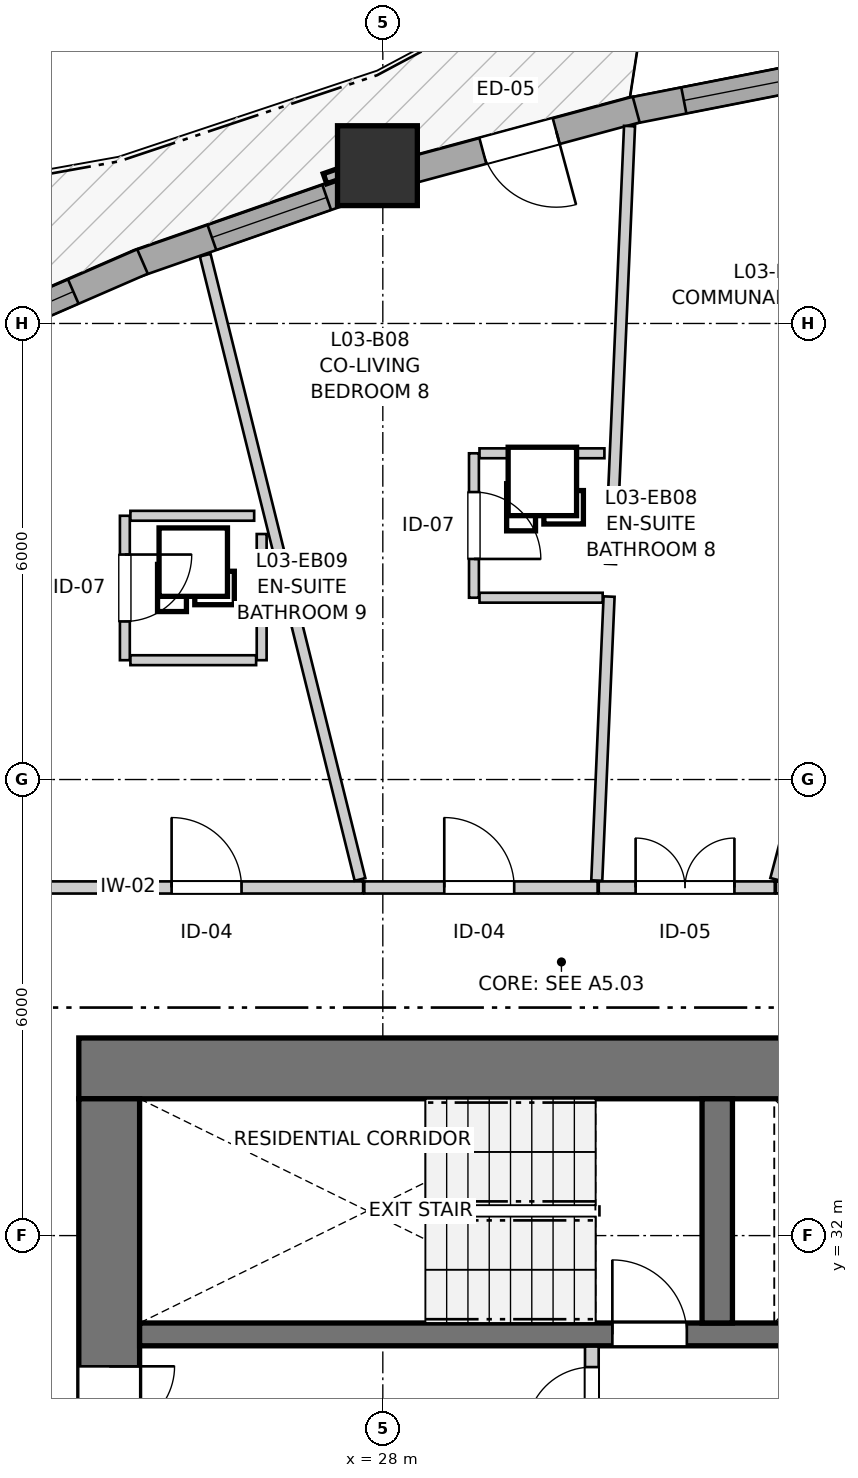
"""IFC4 building model, lengths in metres.
Left out: names, types, materials, properties, quantities, classifications, styles, units other than length and angle.
Written with IfcOpenShell. Run it as: python <this file> out.ifc"""

import sys

from ifc_helpers import new_model, si_unit, direction, frame, frame_2d, origin, origin_2d, place, context, subcontext, project, spatial, rectangle, extrude, source, transform, mapped, element, fill, save


model = new_model("IFC4")
c1 = context("Model", 3, precision=1e-05, world=origin(), true_north=direction((0.0, 1.0)))
c2 = subcontext(c1, "Body", "Model", "MODEL_VIEW")
j1 = project(units=[si_unit("LENGTHUNIT", "METRE"), si_unit("PLANEANGLEUNIT", "RADIAN")], contexts=[c1])
p1 = place(None, origin())
s1 = spatial("IfcSite", under=j1, at=p1, CompositionType="ELEMENT")
p2 = place(p1, origin())
s2 = spatial("IfcBuilding", under=s1, at=p2, CompositionType="ELEMENT")
p3 = place(p2, frame((0.0, 0.0, 14.2)))
s3 = spatial("IfcBuildingStorey", under=s2, at=p3, CompositionType="ELEMENT", Elevation=14.2)
p4 = place(p3, frame((36.7, 34.2, 0.0), z_axis=(0.0, 0.0, 1.0), x_axis=(-1.0, 0.0, 0.0)))
e1 = element("IfcWall", 1, at=p4, inside=s3, PredefinedType="SHEAR", context=c2, shape_type="SweptSolid", body=[
    extrude(rectangle(XDim=12.7, YDim=0.8, at=frame_2d((6.35, 0.0))), origin(), (0.0, 0.0, 1.0), 2.94),
])
p5 = place(p3, frame((24.4, 33.8, 0.0), z_axis=(0.0, 0.0, 1.0), x_axis=(0.0, -1.0, 0.0)))
e2 = element("IfcWall", 2, at=p5, inside=s3, PredefinedType="SHEAR", context=c2, shape_type="SweptSolid", body=[
    extrude(rectangle(XDim=15.6, YDim=0.8, at=frame_2d((7.8, 0.0))), origin(), (0.0, 0.0, 1.0), 2.94),
])
p6 = place(p5, frame((7.05, 0.0, 0.0)))
e3 = element("IfcOpeningElement", 3, at=p6, cuts=e2, PredefinedType="OPENING", context=c2, shape_type="SweptSolid", body=[
    extrude(rectangle(XDim=1.5, YDim=2.15, at=frame_2d((0.75, 1.075))), frame((0.0, 0.41, 0.0), z_axis=(0.0, -1.0, 0.0), x_axis=(1.0, 0.0, 0.0)), (0.0, 0.0, 1.0), 0.82),
])
p7 = place(p5, frame((3.52, 0.0, 0.0)))
e4 = element("IfcOpeningElement", 4, at=p7, cuts=e2, PredefinedType="OPENING", context=c2, shape_type="SweptSolid", body=[
    extrude(rectangle(XDim=0.86, YDim=2.05, at=frame_2d((0.43, 1.025))), frame((0.0, 0.41, 0.0), z_axis=(0.0, -1.0, 0.0), x_axis=(1.0, 0.0, 0.0)), (0.0, 0.0, 1.0), 0.82),
])
p8 = place(p5, frame((11.22, 0.0, 0.0)))
e5 = element("IfcOpeningElement", 5, at=p8, cuts=e2, PredefinedType="OPENING", context=c2, shape_type="SweptSolid", body=[
    extrude(rectangle(XDim=0.86, YDim=2.05, at=frame_2d((0.43, 1.025))), frame((0.0, 0.41, 0.0), z_axis=(0.0, -1.0, 0.0), x_axis=(1.0, 0.0, 0.0)), (0.0, 0.0, 1.0), 0.82),
])
p9 = place(p3, frame((24.8, 30.7, 0.0), z_axis=(0.0, 0.0, 1.0), x_axis=(1.0, 0.0, 0.0)))
e6 = element("IfcWall", 6, at=p9, inside=s3, PredefinedType="SHEAR", context=c2, shape_type="SweptSolid", body=[
    extrude(rectangle(XDim=11.1, YDim=0.3, at=frame_2d((5.55, 0.0))), origin(), (0.0, 0.0, 1.0), 2.94),
])
p10 = place(p9, frame((6.22, 0.0, 0.0)))
e7 = element("IfcOpeningElement", 7, at=p10, cuts=e6, PredefinedType="OPENING", context=c2, shape_type="SweptSolid", body=[
    extrude(rectangle(XDim=0.98, YDim=2.15, at=frame_2d((0.49, 1.075))), frame((0.0, 0.16, 0.0), z_axis=(0.0, -1.0, 0.0), x_axis=(1.0, 0.0, 0.0)), (0.0, 0.0, 1.0), 0.32),
])
p11 = place(p9, frame((9.15, 0.0, 0.0)))
e8 = element("IfcOpeningElement", 8, at=p11, cuts=e6, PredefinedType="OPENING", context=c2, shape_type="SweptSolid", body=[
    extrude(rectangle(XDim=1.15, YDim=2.15, at=frame_2d((0.575, 1.075))), frame((0.0, 0.16, 0.0), z_axis=(0.0, -1.0, 0.0), x_axis=(1.0, 0.0, 0.0)), (0.0, 0.0, 1.0), 0.32),
])
p12 = place(p3, frame((32.4, 30.85, 0.0), z_axis=(0.0, 0.0, 1.0), x_axis=(0.0, 1.0, 0.0)))
e9 = element("IfcWall", 9, at=p12, inside=s3, PredefinedType="SHEAR", context=c2, shape_type="SweptSolid", body=[
    extrude(rectangle(XDim=2.95, YDim=0.4, at=frame_2d((1.475, 0.0))), origin(), (0.0, 0.0, 1.0), 2.94),
])
m1 = source(origin(), c2, "Body", "SweptSolid", [
    extrude(rectangle(XDim=1.05, YDim=1.05, at=origin_2d()), origin(), (0.0, 0.0, 1.0), 2.94),
])
p13 = place(p3, frame((27.929, 46.076, 0.0), z_axis=(0.0, 0.0, 1.0), x_axis=(1.0, 0.0, 0.0)))
e10 = element("IfcColumn", 10, at=p13, inside=s3, PredefinedType="COLUMN", context=c2, shape_type="MappedRepresentation", body=[
    mapped(m1, transform((0.0, 0.0, 0.0), x_axis=(1.0, 0.0, 0.0), y_axis=(0.0, 1.0, 0.0), z_axis=(0.0, 0.0, 1.0), scale=1.0)),
])
p14 = place(p3, frame((34.714, 47.475, 0.0), z_axis=(0.0, 0.0, 1.0), x_axis=(-0.981221268425, -0.192885516282, 0.0)))
e11 = element("IfcWall", 11, at=p14, inside=s3, PredefinedType="SOLIDWALL", context=c2, shape_type="SweptSolid", body=[
    extrude(rectangle(XDim=3.533, YDim=0.35, at=frame_2d((1.766, 0.0))), origin(), (0.0, 0.0, 1.0), 2.42),
])
p15 = place(p14, frame((0.706, 0.0, 0.82)))
e12 = element("IfcOpeningElement", 12, at=p15, cuts=e11, PredefinedType="OPENING", context=c2, shape_type="SweptSolid", body=[
    extrude(rectangle(XDim=2.1, YDim=1.4, at=frame_2d((1.05, 0.7))), frame((0.0, 0.185, 0.0), z_axis=(0.0, -1.0, 0.0), x_axis=(1.0, 0.0, 0.0)), (0.0, 0.0, 1.0), 0.37),
])
p16 = place(p3, frame((31.333, 46.814, 0.0), z_axis=(0.0, 0.0, 1.0), x_axis=(-0.965456905924, -0.260562780926, 0.0)))
e13 = element("IfcWall", 13, at=p16, inside=s3, PredefinedType="SOLIDWALL", context=c2, shape_type="SweptSolid", body=[
    extrude(rectangle(XDim=3.179, YDim=0.35, at=frame_2d((1.59, 0.0))), origin(), (0.0, 0.0, 1.0), 2.42),
])
p17 = place(p16, frame((1.09, 0.0, 0.0)))
e14 = element("IfcOpeningElement", 14, at=p17, cuts=e13, PredefinedType="OPENING", context=c2, shape_type="SweptSolid", body=[
    extrude(rectangle(XDim=1.0, YDim=2.1, at=frame_2d((0.5, 1.05))), frame((0.0, 0.185, 0.0), z_axis=(0.0, -1.0, 0.0), x_axis=(1.0, 0.0, 0.0)), (0.0, 0.0, 1.0), 0.37),
])
p18 = place(p3, frame((27.703, 45.812, 0.0), z_axis=(0.0, 0.0, 1.0), x_axis=(-0.944149283204, -0.329518028377, 0.0)))
e15 = element("IfcWall", 15, at=p18, inside=s3, PredefinedType="SOLIDWALL", context=c2, shape_type="SweptSolid", body=[
    extrude(rectangle(XDim=3.123, YDim=0.35, at=frame_2d((1.562, 0.0))), origin(), (0.0, 0.0, 1.0), 2.42),
])
p19 = place(p18, frame((0.468, 0.0, 0.82)))
e16 = element("IfcOpeningElement", 16, at=p19, cuts=e15, PredefinedType="OPENING", context=c2, shape_type="SweptSolid", body=[
    extrude(rectangle(XDim=1.6, YDim=1.35, at=frame_2d((0.8, 0.675))), frame((0.0, 0.185, 0.0), z_axis=(0.0, -1.0, 0.0), x_axis=(1.0, 0.0, 0.0)), (0.0, 0.0, 1.0), 0.37),
])
p20 = place(p3, frame((24.838, 44.815, 0.0), z_axis=(0.0, 0.0, 1.0), x_axis=(-0.917087357706, -0.398686315712, 0.0)))
e17 = element("IfcWall", 17, at=p20, inside=s3, PredefinedType="SOLIDWALL", context=c2, shape_type="SweptSolid", body=[
    extrude(rectangle(XDim=3.365, YDim=0.35, at=frame_2d((1.683, 0.0))), origin(), (0.0, 0.0, 1.0), 2.42),
])
p21 = place(p20, frame((0.992, 0.0, 0.82)))
e18 = element("IfcOpeningElement", 18, at=p21, cuts=e17, PredefinedType="OPENING", context=c2, shape_type="SweptSolid", body=[
    extrude(rectangle(XDim=1.4, YDim=1.35, at=frame_2d((0.7, 0.675))), frame((0.0, 0.185, 0.0), z_axis=(0.0, -1.0, 0.0), x_axis=(1.0, 0.0, 0.0)), (0.0, 0.0, 1.0), 0.37),
])
p22 = place(p3, frame((30.75, 27.43, 0.0), z_axis=(0.0, 0.0, 1.0), x_axis=(0.0, 1.0, 0.0)))
e19 = element("IfcWall", 19, at=p22, inside=s3, PredefinedType="PARTITIONING", context=c2, shape_type="SweptSolid", body=[
    extrude(rectangle(XDim=3.11, YDim=0.18, at=frame_2d((1.555, 0.0))), origin(), (0.0, 0.0, 1.0), 2.94),
])
p23 = place(p22, frame((1.98, 0.0, 0.0)))
e20 = element("IfcOpeningElement", 20, at=p23, cuts=e19, PredefinedType="OPENING", context=c2, shape_type="SweptSolid", body=[
    extrude(rectangle(XDim=0.86, YDim=2.05, at=frame_2d((0.43, 1.025))), frame((0.0, 0.1, 0.0), z_axis=(0.0, -1.0, 0.0), x_axis=(1.0, 0.0, 0.0)), (0.0, 0.0, 1.0), 0.2),
])
p24 = place(p3, frame((23.618, 36.58, 0.0), z_axis=(0.0, 0.0, 1.0), x_axis=(1.0, 0.0, 0.0)))
e21 = element("IfcWall", 21, at=p24, inside=s3, PredefinedType="PARTITIONING", context=c2, shape_type="SweptSolid", body=[
    extrude(rectangle(XDim=4.123, YDim=0.16, at=frame_2d((2.062, 0.0))), origin(), (0.0, 0.0, 1.0), 2.548),
])
p25 = place(p24, frame((1.603, 0.0, 0.0)))
e22 = element("IfcOpeningElement", 22, at=p25, cuts=e21, PredefinedType="OPENING", context=c2, shape_type="SweptSolid", body=[
    extrude(rectangle(XDim=0.92, YDim=2.1, at=frame_2d((0.46, 1.05))), frame((0.0, 0.09, 0.0), z_axis=(0.0, -1.0, 0.0), x_axis=(1.0, 0.0, 0.0)), (0.0, 0.0, 1.0), 0.18),
])
p26 = place(p3, frame((27.756, 36.58, 0.0), z_axis=(0.0, 0.0, 1.0), x_axis=(1.0, 0.0, 0.0)))
e23 = element("IfcWall", 23, at=p26, inside=s3, PredefinedType="PARTITIONING", context=c2, shape_type="SweptSolid", body=[
    extrude(rectangle(XDim=3.07, YDim=0.16, at=frame_2d((1.535, 0.0))), origin(), (0.0, 0.0, 1.0), 2.94),
])
p27 = place(p26, frame((1.052, 0.0, 0.0)))
e24 = element("IfcOpeningElement", 24, at=p27, cuts=e23, PredefinedType="OPENING", context=c2, shape_type="SweptSolid", body=[
    extrude(rectangle(XDim=0.92, YDim=2.1, at=frame_2d((0.46, 1.05))), frame((0.0, 0.09, 0.0), z_axis=(0.0, -1.0, 0.0), x_axis=(1.0, 0.0, 0.0)), (0.0, 0.0, 1.0), 0.18),
])
p28 = place(p3, frame((30.841, 36.58, 0.0), z_axis=(0.0, 0.0, 1.0), x_axis=(1.0, 0.0, 0.0)))
e25 = element("IfcWall", 25, at=p28, inside=s3, PredefinedType="PARTITIONING", context=c2, shape_type="SweptSolid", body=[
    extrude(rectangle(XDim=2.316, YDim=0.16, at=frame_2d((1.158, 0.0))), origin(), (0.0, 0.0, 1.0), 2.94),
])
p29 = place(p28, frame((0.485, 0.0, 0.0)))
e26 = element("IfcOpeningElement", 26, at=p29, cuts=e25, PredefinedType="OPENING", context=c2, shape_type="SweptSolid", body=[
    extrude(rectangle(XDim=1.3, YDim=2.1, at=frame_2d((0.65, 1.05))), frame((0.0, 0.09, 0.0), z_axis=(0.0, -1.0, 0.0), x_axis=(1.0, 0.0, 0.0)), (0.0, 0.0, 1.0), 0.18),
])
p30 = place(p3, frame((33.172, 36.58, 0.0), z_axis=(0.0, 0.0, 1.0), x_axis=(1.0, 0.0, 0.0)))
e27 = element("IfcWall", 27, at=p30, inside=s3, PredefinedType="PARTITIONING", context=c2, shape_type="SweptSolid", body=[
    extrude(rectangle(XDim=2.173, YDim=0.16, at=frame_2d((1.086, 0.0))), origin(), (0.0, 0.0, 1.0), 2.94),
])
p31 = place(p30, frame((0.603, 0.0, 0.0)))
e28 = element("IfcOpeningElement", 28, at=p31, cuts=e27, PredefinedType="OPENING", context=c2, shape_type="SweptSolid", body=[
    extrude(rectangle(XDim=0.92, YDim=2.1, at=frame_2d((0.46, 1.05))), frame((0.0, 0.09, 0.0), z_axis=(0.0, -1.0, 0.0), x_axis=(1.0, 0.0, 0.0)), (0.0, 0.0, 1.0), 0.18),
])
p32 = place(p3, frame((29.199, 42.292, 0.0), z_axis=(0.0, 0.0, 1.0), x_axis=(0.0, -1.0, 0.0)))
e29 = element("IfcWall", 29, at=p32, inside=s3, PredefinedType="PARTITIONING", context=c2, shape_type="SweptSolid", body=[
    extrude(rectangle(XDim=1.9, YDim=0.13, at=frame_2d((0.95, 0.0))), origin(), (0.0, 0.0, 1.0), 2.94),
])
p33 = place(p32, frame((0.51, 0.0, 0.0)))
e30 = element("IfcOpeningElement", 30, at=p33, cuts=e29, PredefinedType="OPENING", context=c2, shape_type="SweptSolid", body=[
    extrude(rectangle(XDim=0.88, YDim=2.05, at=frame_2d((0.44, 1.025))), frame((0.0, 0.075, 0.0), z_axis=(0.0, -1.0, 0.0), x_axis=(1.0, 0.0, 0.0)), (0.0, 0.0, 1.0), 0.15),
])
p34 = place(p3, frame((24.606, 41.47, 0.0), z_axis=(0.0, 0.0, 1.0), x_axis=(0.0, -1.0, 0.0)))
e31 = element("IfcWall", 31, at=p34, inside=s3, PredefinedType="PARTITIONING", context=c2, shape_type="SweptSolid", body=[
    extrude(rectangle(XDim=1.9, YDim=0.13, at=frame_2d((0.95, 0.0))), origin(), (0.0, 0.0, 1.0), 2.94),
])
p35 = place(p34, frame((0.51, 0.0, 0.0)))
e32 = element("IfcOpeningElement", 32, at=p35, cuts=e31, PredefinedType="OPENING", context=c2, shape_type="SweptSolid", body=[
    extrude(rectangle(XDim=0.88, YDim=2.05, at=frame_2d((0.44, 1.025))), frame((0.0, 0.075, 0.0), z_axis=(0.0, -1.0, 0.0), x_axis=(1.0, 0.0, 0.0)), (0.0, 0.0, 1.0), 0.15),
])
p36 = place(p3, frame((33.169, 36.686, 0.0), z_axis=(0.0, 0.0, 1.0), x_axis=(0.255112522394, 0.966911371801, 0.0)))
e33 = element("IfcWall", 33, at=p36, inside=s3, PredefinedType="PARTITIONING", context=c2, shape_type="SweptSolid", body=[
    extrude(rectangle(XDim=11.469, YDim=0.145, at=frame_2d((5.734, 0.0))), origin(), (0.0, 0.0, 1.0), 2.94),
])
p37 = place(p3, frame((25.663, 44.899, 0.0), z_axis=(0.0, 0.0, 1.0), x_axis=(0.240695577024, -0.970600658974, 0.0)))
e34 = element("IfcWall", 34, at=p37, inside=s3, PredefinedType="PARTITIONING", context=c2, shape_type="SweptSolid", body=[
    extrude(rectangle(XDim=8.462, YDim=0.145, at=frame_2d((4.231, 0.0))), origin(), (0.0, 0.0, 1.0), 2.94),
])
p38 = place(p3, frame((30.996, 40.836, 0.0), z_axis=(0.0, 0.0, 1.0), x_axis=(0.043354544378, 0.999059749706, 0.0)))
e35 = element("IfcWall", 35, at=p38, inside=s3, PredefinedType="PARTITIONING", context=c2, shape_type="SweptSolid", body=[
    extrude(rectangle(XDim=5.766, YDim=0.145, at=frame_2d((2.883, 0.0))), origin(), (0.0, 0.0, 1.0), 2.94),
])
p39 = place(p3, frame((30.815, 36.671, 0.0), z_axis=(0.0, 0.0, 1.0), x_axis=(0.043352224588, 0.999059850371, 0.0)))
e36 = element("IfcWall", 36, at=p39, inside=s3, PredefinedType="PARTITIONING", context=c2, shape_type="SweptSolid", body=[
    extrude(rectangle(XDim=3.739, YDim=0.145, at=frame_2d((1.87, 0.0))), origin(), (0.0, 0.0, 1.0), 2.94),
])
p40 = place(p3, frame((26.406, 39.57, 0.0), z_axis=(0.0, 0.0, 1.0), x_axis=(0.0, 1.0, 0.0)))
e37 = element("IfcWall", 37, at=p40, inside=s3, PredefinedType="PARTITIONING", context=c2, shape_type="SweptSolid", body=[
    extrude(rectangle(XDim=1.66, YDim=0.13, at=frame_2d((0.83, 0.0))), origin(), (0.0, 0.0, 1.0), 2.94),
])
p41 = place(p3, frame((29.272, 42.292, 0.0), z_axis=(0.0, 0.0, 1.0), x_axis=(1.0, 0.0, 0.0)))
e38 = element("IfcWall", 38, at=p41, inside=s3, PredefinedType="PARTITIONING", context=c2, shape_type="SweptSolid", body=[
    extrude(rectangle(XDim=1.644, YDim=0.13, at=frame_2d((0.822, 0.0))), origin(), (0.0, 0.0, 1.0), 2.508),
])
p42 = place(p3, frame((24.679, 41.47, 0.0), z_axis=(0.0, 0.0, 1.0), x_axis=(1.0, 0.0, 0.0)))
e39 = element("IfcWall", 39, at=p42, inside=s3, PredefinedType="PARTITIONING", context=c2, shape_type="SweptSolid", body=[
    extrude(rectangle(XDim=1.628, YDim=0.13, at=frame_2d((0.814, 0.0))), origin(), (0.0, 0.0, 1.0), 2.508),
])
p43 = place(p3, frame((24.679, 39.57, 0.0), z_axis=(0.0, 0.0, 1.0), x_axis=(1.0, 0.0, 0.0)))
e40 = element("IfcWall", 40, at=p43, inside=s3, PredefinedType="PARTITIONING", context=c2, shape_type="SweptSolid", body=[
    extrude(rectangle(XDim=1.654, YDim=0.13, at=frame_2d((0.827, 0.0))), origin(), (0.0, 0.0, 1.0), 2.94),
])
p44 = place(p3, frame((29.272, 40.392, 0.0), z_axis=(0.0, 0.0, 1.0), x_axis=(1.0, 0.0, 0.0)))
e41 = element("IfcWall", 41, at=p44, inside=s3, PredefinedType="PARTITIONING", context=c2, shape_type="SweptSolid", body=[
    extrude(rectangle(XDim=1.621, YDim=0.13, at=frame_2d((0.81, 0.0))), origin(), (0.0, 0.0, 1.0), 2.94),
])
m2 = source(origin(), c2, "Body", "SweptSolid", [
    extrude(rectangle(XDim=2.1, YDim=1.4, at=frame_2d((1.05, 0.7))), frame((0.0, 0.03, 0.0), z_axis=(0.0, -1.0, 0.0), x_axis=(1.0, 0.0, 0.0)), (0.0, 0.0, 1.0), 0.06),
])
p45 = place(p15, origin())
e42 = element("IfcWindow", 42, at=p45, inside=s3, PartitioningType="SINGLE_PANEL", PredefinedType="WINDOW", context=c2, shape_type="MappedRepresentation", body=[
    mapped(m2, transform((0.0, 0.0, 0.0), x_axis=(1.0, 0.0, 0.0), y_axis=(0.0, 1.0, 0.0), z_axis=(0.0, 0.0, 1.0), scale=1.0)),
])
fill(e12, e42)
m3 = source(origin(), c2, "Body", "SweptSolid", [
    extrude(rectangle(XDim=1.6, YDim=1.35, at=frame_2d((0.8, 0.675))), frame((0.0, 0.03, 0.0), z_axis=(0.0, -1.0, 0.0), x_axis=(1.0, 0.0, 0.0)), (0.0, 0.0, 1.0), 0.06),
])
p46 = place(p19, origin())
e43 = element("IfcWindow", 43, at=p46, inside=s3, PartitioningType="SINGLE_PANEL", PredefinedType="WINDOW", context=c2, shape_type="MappedRepresentation", body=[
    mapped(m3, transform((0.0, 0.0, 0.0), x_axis=(1.0, 0.0, 0.0), y_axis=(0.0, 1.0, 0.0), z_axis=(0.0, 0.0, 1.0), scale=1.0)),
])
fill(e16, e43)
m4 = source(origin(), c2, "Body", "SweptSolid", [
    extrude(rectangle(XDim=1.4, YDim=1.35, at=frame_2d((0.7, 0.675))), frame((0.0, 0.03, 0.0), z_axis=(0.0, -1.0, 0.0), x_axis=(1.0, 0.0, 0.0)), (0.0, 0.0, 1.0), 0.06),
])
p47 = place(p21, origin())
e44 = element("IfcWindow", 44, at=p47, inside=s3, PartitioningType="SINGLE_PANEL", PredefinedType="WINDOW", context=c2, shape_type="MappedRepresentation", body=[
    mapped(m4, transform((0.0, 0.0, 0.0), x_axis=(1.0, 0.0, 0.0), y_axis=(0.0, 1.0, 0.0), z_axis=(0.0, 0.0, 1.0), scale=1.0)),
])
fill(e18, e44)
m5 = source(origin(), c2, "Body", "SweptSolid", [
    extrude(rectangle(XDim=1.0, YDim=2.1, at=frame_2d((0.5, 1.05))), frame((0.0, 0.025, 0.0), z_axis=(0.0, -1.0, 0.0), x_axis=(1.0, 0.0, 0.0)), (0.0, 0.0, 1.0), 0.05),
])
p48 = place(p17, origin())
e45 = element("IfcDoor", 45, at=p48, inside=s3, OperationType="SINGLE_SWING_LEFT", PredefinedType="DOOR", context=c2, shape_type="MappedRepresentation", body=[
    mapped(m5, transform((0.0, 0.0, 0.0), x_axis=(1.0, 0.0, 0.0), y_axis=(0.0, 1.0, 0.0), z_axis=(0.0, 0.0, 1.0), scale=1.0)),
])
fill(e14, e45)
m6 = source(origin(), c2, "Body", "SweptSolid", [
    extrude(rectangle(XDim=0.98, YDim=2.15, at=frame_2d((0.49, 1.075))), frame((0.0, 0.025, 0.0), z_axis=(0.0, -1.0, 0.0), x_axis=(1.0, 0.0, 0.0)), (0.0, 0.0, 1.0), 0.05),
])
p49 = place(p10, origin())
e46 = element("IfcDoor", 46, at=p49, inside=s3, OperationType="SINGLE_SWING_LEFT", PredefinedType="DOOR", context=c2, shape_type="MappedRepresentation", body=[
    mapped(m6, transform((0.0, 0.0, 0.0), x_axis=(1.0, 0.0, 0.0), y_axis=(0.0, 1.0, 0.0), z_axis=(0.0, 0.0, 1.0), scale=1.0)),
])
fill(e7, e46)
m7 = source(origin(), c2, "Body", "SweptSolid", [
    extrude(rectangle(XDim=0.86, YDim=2.05, at=frame_2d((0.43, 1.025))), frame((0.0, 0.025, 0.0), z_axis=(0.0, -1.0, 0.0), x_axis=(1.0, 0.0, 0.0)), (0.0, 0.0, 1.0), 0.05),
])
p50 = place(p7, origin())
e47 = element("IfcDoor", 47, at=p50, inside=s3, OperationType="SINGLE_SWING_LEFT", PredefinedType="DOOR", context=c2, shape_type="MappedRepresentation", body=[
    mapped(m7, transform((0.0, 0.0, 0.0), x_axis=(1.0, 0.0, 0.0), y_axis=(0.0, 1.0, 0.0), z_axis=(0.0, 0.0, 1.0), scale=1.0)),
])
fill(e4, e47)
p51 = place(p23, origin())
e48 = element("IfcDoor", 48, at=p51, inside=s3, OperationType="SINGLE_SWING_LEFT", PredefinedType="DOOR", context=c2, shape_type="MappedRepresentation", body=[
    mapped(m7, transform((0.0, 0.0, 0.0), x_axis=(1.0, 0.0, 0.0), y_axis=(0.0, 1.0, 0.0), z_axis=(0.0, 0.0, 1.0), scale=1.0)),
])
fill(e20, e48)
m8 = source(origin(), c2, "Body", "SweptSolid", [
    extrude(rectangle(XDim=0.92, YDim=2.1, at=frame_2d((0.46, 1.05))), frame((0.0, 0.025, 0.0), z_axis=(0.0, -1.0, 0.0), x_axis=(1.0, 0.0, 0.0)), (0.0, 0.0, 1.0), 0.05),
])
p52 = place(p25, origin())
e49 = element("IfcDoor", 49, at=p52, inside=s3, OperationType="SINGLE_SWING_LEFT", PredefinedType="DOOR", context=c2, shape_type="MappedRepresentation", body=[
    mapped(m8, transform((0.0, 0.0, 0.0), x_axis=(1.0, 0.0, 0.0), y_axis=(0.0, 1.0, 0.0), z_axis=(0.0, 0.0, 1.0), scale=1.0)),
])
fill(e22, e49)
p53 = place(p27, origin())
e50 = element("IfcDoor", 50, at=p53, inside=s3, OperationType="SINGLE_SWING_LEFT", PredefinedType="DOOR", context=c2, shape_type="MappedRepresentation", body=[
    mapped(m8, transform((0.0, 0.0, 0.0), x_axis=(1.0, 0.0, 0.0), y_axis=(0.0, 1.0, 0.0), z_axis=(0.0, 0.0, 1.0), scale=1.0)),
])
fill(e24, e50)
m9 = source(origin(), c2, "Body", "SweptSolid", [
    extrude(rectangle(XDim=1.3, YDim=2.1, at=frame_2d((0.65, 1.05))), frame((0.0, 0.025, 0.0), z_axis=(0.0, -1.0, 0.0), x_axis=(1.0, 0.0, 0.0)), (0.0, 0.0, 1.0), 0.05),
])
p54 = place(p29, origin())
e51 = element("IfcDoor", 51, at=p54, inside=s3, OperationType="DOUBLE_DOOR_SINGLE_SWING", PredefinedType="DOOR", context=c2, shape_type="MappedRepresentation", body=[
    mapped(m9, transform((0.0, 0.0, 0.0), x_axis=(1.0, 0.0, 0.0), y_axis=(0.0, 1.0, 0.0), z_axis=(0.0, 0.0, 1.0), scale=1.0)),
])
fill(e26, e51)
m10 = source(origin(), c2, "Body", "SweptSolid", [
    extrude(rectangle(XDim=0.88, YDim=2.05, at=frame_2d((0.44, 1.025))), frame((0.0, 0.025, 0.0), z_axis=(0.0, -1.0, 0.0), x_axis=(1.0, 0.0, 0.0)), (0.0, 0.0, 1.0), 0.05),
])
p55 = place(p33, origin())
e52 = element("IfcDoor", 52, at=p55, inside=s3, OperationType="SINGLE_SWING_RIGHT", PredefinedType="DOOR", context=c2, shape_type="MappedRepresentation", body=[
    mapped(m10, transform((0.0, 0.0, 0.0), x_axis=(1.0, 0.0, 0.0), y_axis=(0.0, 1.0, 0.0), z_axis=(0.0, 0.0, 1.0), scale=1.0)),
])
fill(e30, e52)
p56 = place(p35, origin())
e53 = element("IfcDoor", 53, at=p56, inside=s3, OperationType="SINGLE_SWING_LEFT", PredefinedType="DOOR", context=c2, shape_type="MappedRepresentation", body=[
    mapped(m10, transform((0.0, 0.0, 0.0), x_axis=(1.0, 0.0, 0.0), y_axis=(0.0, 1.0, 0.0), z_axis=(0.0, 0.0, 1.0), scale=1.0)),
])
fill(e32, e53)
save(model, sys.argv[1])
